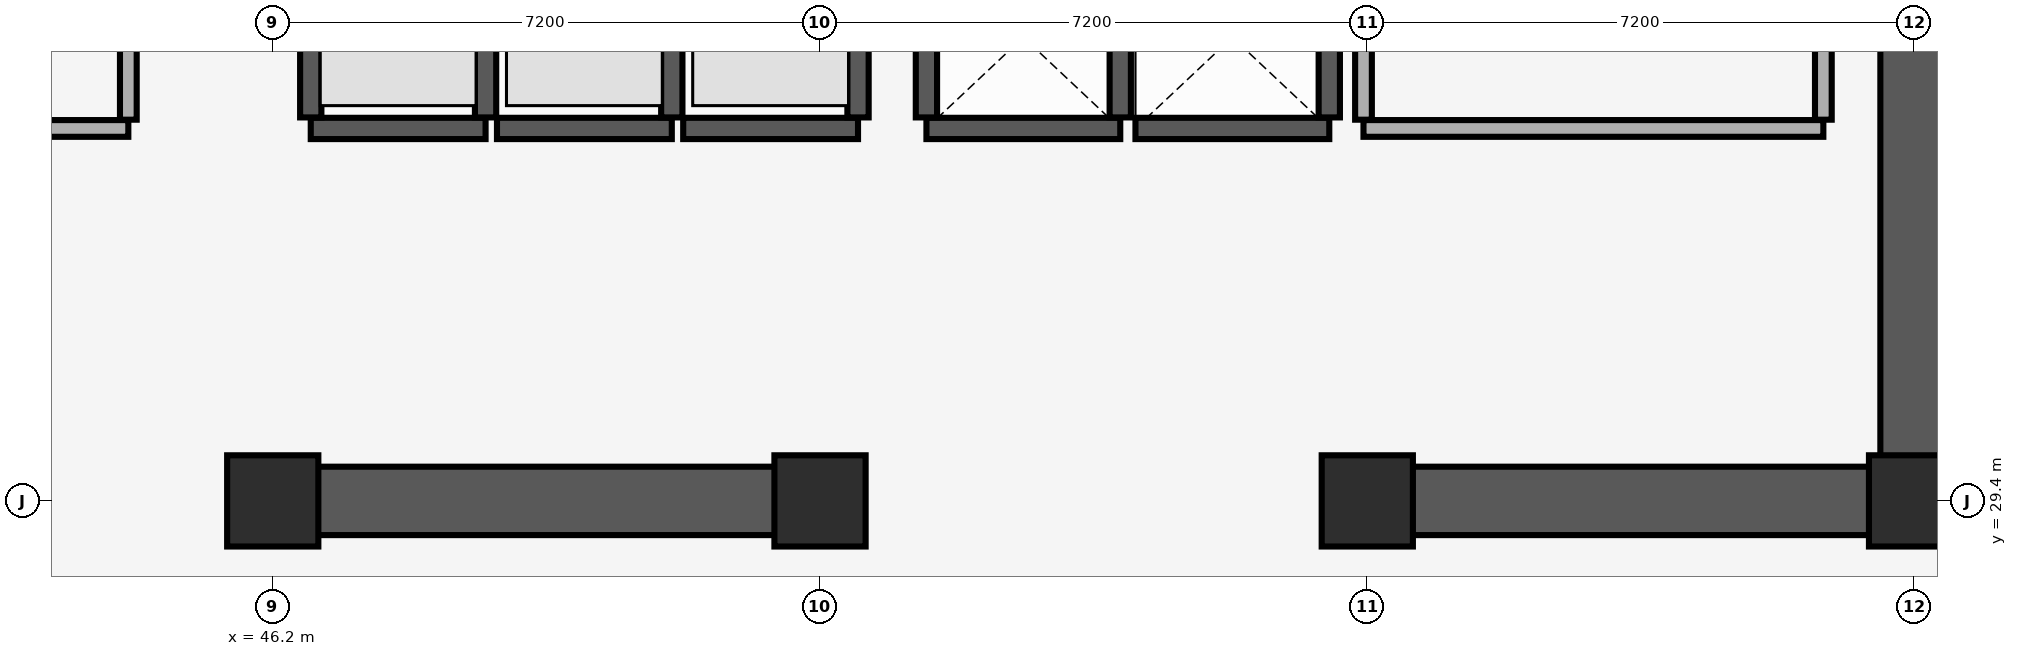
"""IFC4 building model, lengths in metres.
Left out: names, types, materials, properties, quantities, classifications, styles, units other than length and angle.
Written with IfcOpenShell. Run it as: python <this file> out.ifc"""

import sys

from ifc_helpers import new_model, si_unit, direction, frame, frame_2d, origin, origin_2d, place, context, subcontext, project, spatial, rectangle, extrude, element, fill, save


model = new_model("IFC4")
c1 = context("Model", 3, precision=1e-05, world=origin(), true_north=direction((0.0, 1.0)))
c2 = subcontext(c1, "Body", "Model", "MODEL_VIEW")
j1 = project(units=[si_unit("LENGTHUNIT", "METRE"), si_unit("PLANEANGLEUNIT", "RADIAN")], contexts=[c1])
p1 = place(None, origin())
s1 = spatial("IfcSite", under=j1, at=p1, CompositionType="ELEMENT")
p2 = place(p1, origin())
s2 = spatial("IfcBuilding", under=s1, at=p2, CompositionType="ELEMENT")
p3 = place(p2, frame((0.0, 0.0, 224.35)))
s3 = spatial("IfcBuildingStorey", under=s2, at=p3, CompositionType="ELEMENT", Elevation=224.35)
for number, where, z_axis, x_axis in (
    (1, (46.2, 29.4, 0.0), (0.0, 0.0, 1.0), (1.0, 0.0, 0.0)),
    (2, (53.4, 29.4, 0.0), (0.0, 0.0, 1.0), (1.0, 0.0, 0.0)),
    (3, (60.6, 29.4, 0.0), (0.0, 0.0, 1.0), (1.0, 0.0, 0.0)),
    (4, (67.8, 29.4, 0.0), (0.0, 0.0, 1.0), (1.0, 0.0, 0.0)),
):
    element("IfcColumn", number, at=place(p3, frame(where, z_axis=z_axis, x_axis=x_axis)), inside=s3, PredefinedType="COLUMN", context=c2, shape_type="SweptSolid", body=[
        extrude(rectangle(XDim=1.2, YDim=1.2, at=origin_2d()), origin(), (0.0, 0.0, 1.0), 4.56),
    ])
p4 = place(p3, frame((67.8, 29.4, 0.0), z_axis=(0.0, 0.0, 1.0), x_axis=(0.0, 1.0, 0.0)))
e5 = element("IfcWall", 5, at=p4, inside=s3, PredefinedType="SHEAR", context=c2, shape_type="SweptSolid", body=[
    extrude(rectangle(XDim=19.2, YDim=0.9, at=frame_2d((9.6, 0.0))), origin(), (0.0, 0.0, 1.0), 4.52),
])
p5 = place(p3, frame((46.0, 29.4, 0.0), z_axis=(0.0, 0.0, 1.0), x_axis=(1.0, 0.0, 0.0)))
e6 = element("IfcWall", 6, at=p5, inside=s3, PredefinedType="SHEAR", context=c2, shape_type="SweptSolid", body=[
    extrude(rectangle(XDim=7.6, YDim=0.9, at=frame_2d((3.8, 0.0))), origin(), (0.0, 0.0, 1.0), 4.52),
])
p6 = place(p3, frame((60.4, 29.4, 0.0), z_axis=(0.0, 0.0, 1.0), x_axis=(1.0, 0.0, 0.0)))
e7 = element("IfcWall", 7, at=p6, inside=s3, PredefinedType="SHEAR", context=c2, shape_type="SweptSolid", body=[
    extrude(rectangle(XDim=6.945, YDim=0.9, at=frame_2d((3.473, 0.0))), origin(), (0.0, 0.0, 1.0), 4.52),
])
p7 = place(p3, frame((46.7, 34.3, 0.0), z_axis=(0.0, 0.0, 1.0), x_axis=(1.0, 0.0, 0.0)))
e8 = element("IfcWall", 8, at=p7, inside=s3, PredefinedType="SHEAR", context=c2, shape_type="SweptSolid", body=[
    extrude(rectangle(XDim=2.3, YDim=0.28, at=frame_2d((1.15, 0.0))), origin(), (0.0, 0.0, 1.0), 4.52),
])
p8 = place(p7, frame((0.6, 0.0, 0.0)))
e9 = element("IfcOpeningElement", 9, at=p8, cuts=e8, PredefinedType="OPENING", context=c2, shape_type="SweptSolid", body=[
    extrude(rectangle(XDim=1.1, YDim=2.2, at=frame_2d((0.55, 1.1))), frame((0.0, 0.15, 0.0), z_axis=(0.0, -1.0, 0.0), x_axis=(1.0, 0.0, 0.0)), (0.0, 0.0, 1.0), 0.3),
])
for number, where, z_axis, x_axis in (
    (10, (46.7, 34.445, 0.0), (0.0, 0.0, 1.0), (0.0, 1.0, 0.0)),
    (11, (49.0, 34.445, 0.0), (0.0, 0.0, 1.0), (0.0, 1.0, 0.0)),
):
    element("IfcWall", number, at=place(p3, frame(where, z_axis=z_axis, x_axis=x_axis)), inside=s3, PredefinedType="SHEAR", context=c2, shape_type="SweptSolid", body=[
        extrude(rectangle(XDim=2.01, YDim=0.28, at=frame_2d((1.005, 0.0))), origin(), (0.0, 0.0, 1.0), 4.52),
    ])
p9 = place(p3, frame((49.15, 34.3, 0.0), z_axis=(0.0, 0.0, 1.0), x_axis=(1.0, 0.0, 0.0)))
e12 = element("IfcWall", 12, at=p9, inside=s3, PredefinedType="SHEAR", context=c2, shape_type="SweptSolid", body=[
    extrude(rectangle(XDim=2.3, YDim=0.28, at=frame_2d((1.15, 0.0))), origin(), (0.0, 0.0, 1.0), 4.52),
])
p10 = place(p9, frame((0.6, 0.0, 0.0)))
e13 = element("IfcOpeningElement", 13, at=p10, cuts=e12, PredefinedType="OPENING", context=c2, shape_type="SweptSolid", body=[
    extrude(rectangle(XDim=1.1, YDim=2.2, at=frame_2d((0.55, 1.1))), frame((0.0, 0.15, 0.0), z_axis=(0.0, -1.0, 0.0), x_axis=(1.0, 0.0, 0.0)), (0.0, 0.0, 1.0), 0.3),
])
p11 = place(p3, frame((51.45, 34.445, 0.0), z_axis=(0.0, 0.0, 1.0), x_axis=(0.0, 1.0, 0.0)))
e14 = element("IfcWall", 14, at=p11, inside=s3, PredefinedType="SHEAR", context=c2, shape_type="SweptSolid", body=[
    extrude(rectangle(XDim=2.01, YDim=0.28, at=frame_2d((1.005, 0.0))), origin(), (0.0, 0.0, 1.0), 4.52),
])
p12 = place(p3, frame((51.6, 34.3, 0.0), z_axis=(0.0, 0.0, 1.0), x_axis=(1.0, 0.0, 0.0)))
e15 = element("IfcWall", 15, at=p12, inside=s3, PredefinedType="SHEAR", context=c2, shape_type="SweptSolid", body=[
    extrude(rectangle(XDim=2.3, YDim=0.28, at=frame_2d((1.15, 0.0))), origin(), (0.0, 0.0, 1.0), 4.52),
])
p13 = place(p12, frame((0.6, 0.0, 0.0)))
e16 = element("IfcOpeningElement", 16, at=p13, cuts=e15, PredefinedType="OPENING", context=c2, shape_type="SweptSolid", body=[
    extrude(rectangle(XDim=1.1, YDim=2.2, at=frame_2d((0.55, 1.1))), frame((0.0, 0.15, 0.0), z_axis=(0.0, -1.0, 0.0), x_axis=(1.0, 0.0, 0.0)), (0.0, 0.0, 1.0), 0.3),
])
p14 = place(p3, frame((53.9, 34.445, 0.0), z_axis=(0.0, 0.0, 1.0), x_axis=(0.0, 1.0, 0.0)))
e17 = element("IfcWall", 17, at=p14, inside=s3, PredefinedType="SHEAR", context=c2, shape_type="SweptSolid", body=[
    extrude(rectangle(XDim=2.01, YDim=0.28, at=frame_2d((1.005, 0.0))), origin(), (0.0, 0.0, 1.0), 4.52),
])
p15 = place(p3, frame((54.8, 34.3, 0.0), z_axis=(0.0, 0.0, 1.0), x_axis=(1.0, 0.0, 0.0)))
e18 = element("IfcWall", 18, at=p15, inside=s3, PredefinedType="SHEAR", context=c2, shape_type="SweptSolid", body=[
    extrude(rectangle(XDim=2.55, YDim=0.28, at=frame_2d((1.275, 0.0))), origin(), (0.0, 0.0, 1.0), 4.52),
])
for number, where, z_axis, x_axis in (
    (19, (54.8, 34.445, 0.0), (0.0, 0.0, 1.0), (0.0, 1.0, 0.0)),
    (20, (57.35, 34.445, 0.0), (0.0, 0.0, 1.0), (0.0, 1.0, 0.0)),
):
    element("IfcWall", number, at=place(p3, frame(where, z_axis=z_axis, x_axis=x_axis)), inside=s3, PredefinedType="SHEAR", context=c2, shape_type="SweptSolid", body=[
        extrude(rectangle(XDim=2.11, YDim=0.28, at=frame_2d((1.055, 0.0))), origin(), (0.0, 0.0, 1.0), 4.52),
    ])
p16 = place(p3, frame((57.55, 34.3, 0.0), z_axis=(0.0, 0.0, 1.0), x_axis=(1.0, 0.0, 0.0)))
e21 = element("IfcWall", 21, at=p16, inside=s3, PredefinedType="SHEAR", context=c2, shape_type="SweptSolid", body=[
    extrude(rectangle(XDim=2.55, YDim=0.28, at=frame_2d((1.275, 0.0))), origin(), (0.0, 0.0, 1.0), 4.52),
])
p17 = place(p3, frame((60.1, 34.445, 0.0), z_axis=(0.0, 0.0, 1.0), x_axis=(0.0, 1.0, 0.0)))
e22 = element("IfcWall", 22, at=p17, inside=s3, PredefinedType="SHEAR", context=c2, shape_type="SweptSolid", body=[
    extrude(rectangle(XDim=2.11, YDim=0.28, at=frame_2d((1.055, 0.0))), origin(), (0.0, 0.0, 1.0), 4.52),
])
p18 = place(p3, frame((60.55, 34.3, 0.0), z_axis=(0.0, 0.0, 1.0), x_axis=(1.0, 0.0, 0.0)))
e23 = element("IfcWall", 23, at=p18, inside=s3, PredefinedType="PARTITIONING", context=c2, shape_type="SweptSolid", body=[
    extrude(rectangle(XDim=6.05, YDim=0.22, at=frame_2d((3.025, 0.0))), origin(), (0.0, 0.0, 1.0), 4.52),
])
p19 = place(p18, frame((2.65, 0.0, 0.0)))
e24 = element("IfcOpeningElement", 24, at=p19, cuts=e23, PredefinedType="OPENING", context=c2, shape_type="SweptSolid", body=[
    extrude(rectangle(XDim=1.2, YDim=2.15, at=frame_2d((0.6, 1.075))), frame((0.0, 0.12, 0.0), z_axis=(0.0, -1.0, 0.0), x_axis=(1.0, 0.0, 0.0)), (0.0, 0.0, 1.0), 0.24),
])
p20 = place(p3, frame((60.55, 34.415, 0.0), z_axis=(0.0, 0.0, 1.0), x_axis=(0.0, 1.0, 0.0)))
e25 = element("IfcWall", 25, at=p20, inside=s3, PredefinedType="PARTITIONING", context=c2, shape_type="SweptSolid", body=[
    extrude(rectangle(XDim=5.64, YDim=0.22, at=frame_2d((2.82, 0.0))), origin(), (0.0, 0.0, 1.0), 4.52),
])
p21 = place(p3, frame((66.6, 34.415, 0.0), z_axis=(0.0, 0.0, 1.0), x_axis=(0.0, 1.0, 0.0)))
e26 = element("IfcWall", 26, at=p21, inside=s3, PredefinedType="PARTITIONING", context=c2, shape_type="SweptSolid", body=[
    extrude(rectangle(XDim=5.43, YDim=0.22, at=frame_2d((2.715, 0.0))), origin(), (0.0, 0.0, 1.0), 4.52),
])
p22 = place(p3, frame((39.7, 34.3, 0.0), z_axis=(0.0, 0.0, 1.0), x_axis=(1.0, 0.0, 0.0)))
e27 = element("IfcWall", 27, at=p22, inside=s3, PredefinedType="PARTITIONING", context=c2, shape_type="SweptSolid", body=[
    extrude(rectangle(XDim=4.6, YDim=0.22, at=frame_2d((2.3, 0.0))), origin(), (0.0, 0.0, 1.0), 4.52),
])
p23 = place(p22, frame((1.7, 0.0, 0.0)))
e28 = element("IfcOpeningElement", 28, at=p23, cuts=e27, PredefinedType="OPENING", context=c2, shape_type="SweptSolid", body=[
    extrude(rectangle(XDim=1.2, YDim=2.15, at=frame_2d((0.6, 1.075))), frame((0.0, 0.12, 0.0), z_axis=(0.0, -1.0, 0.0), x_axis=(1.0, 0.0, 0.0)), (0.0, 0.0, 1.0), 0.24),
])
p24 = place(p3, frame((44.3, 34.415, 0.0), z_axis=(0.0, 0.0, 1.0), x_axis=(0.0, 1.0, 0.0)))
e29 = element("IfcWall", 29, at=p24, inside=s3, PredefinedType="PARTITIONING", context=c2, shape_type="SweptSolid", body=[
    extrude(rectangle(XDim=5.785, YDim=0.22, at=frame_2d((2.893, 0.0))), origin(), (0.0, 0.0, 1.0), 4.52),
])
p25 = place(p8, origin())
e30 = element("IfcDoor", 30, at=p25, inside=s3, OperationType="DOUBLE_DOOR_SLIDING", PredefinedType="DOOR", context=c2, shape_type="SweptSolid", body=[
    extrude(rectangle(XDim=1.1, YDim=2.2, at=frame_2d((0.55, 1.1))), frame((0.0, 0.025, 0.0), z_axis=(0.0, -1.0, 0.0), x_axis=(1.0, 0.0, 0.0)), (0.0, 0.0, 1.0), 0.05),
])
fill(e9, e30)
p26 = place(p10, origin())
e31 = element("IfcDoor", 31, at=p26, inside=s3, OperationType="DOUBLE_DOOR_SLIDING", PredefinedType="DOOR", context=c2, shape_type="SweptSolid", body=[
    extrude(rectangle(XDim=1.1, YDim=2.2, at=frame_2d((0.55, 1.1))), frame((0.0, 0.025, 0.0), z_axis=(0.0, -1.0, 0.0), x_axis=(1.0, 0.0, 0.0)), (0.0, 0.0, 1.0), 0.05),
])
fill(e13, e31)
p27 = place(p13, origin())
e32 = element("IfcDoor", 32, at=p27, inside=s3, OperationType="DOUBLE_DOOR_SLIDING", PredefinedType="DOOR", context=c2, shape_type="SweptSolid", body=[
    extrude(rectangle(XDim=1.1, YDim=2.2, at=frame_2d((0.55, 1.1))), frame((0.0, 0.025, 0.0), z_axis=(0.0, -1.0, 0.0), x_axis=(1.0, 0.0, 0.0)), (0.0, 0.0, 1.0), 0.05),
])
fill(e16, e32)
p28 = place(p19, origin())
e33 = element("IfcDoor", 33, at=p28, inside=s3, OperationType="SINGLE_SWING_RIGHT", PredefinedType="DOOR", context=c2, shape_type="SweptSolid", body=[
    extrude(rectangle(XDim=1.2, YDim=2.15, at=frame_2d((0.6, 1.075))), frame((0.0, 0.025, 0.0), z_axis=(0.0, -1.0, 0.0), x_axis=(1.0, 0.0, 0.0)), (0.0, 0.0, 1.0), 0.05),
])
fill(e24, e33)
save(model, sys.argv[1])
